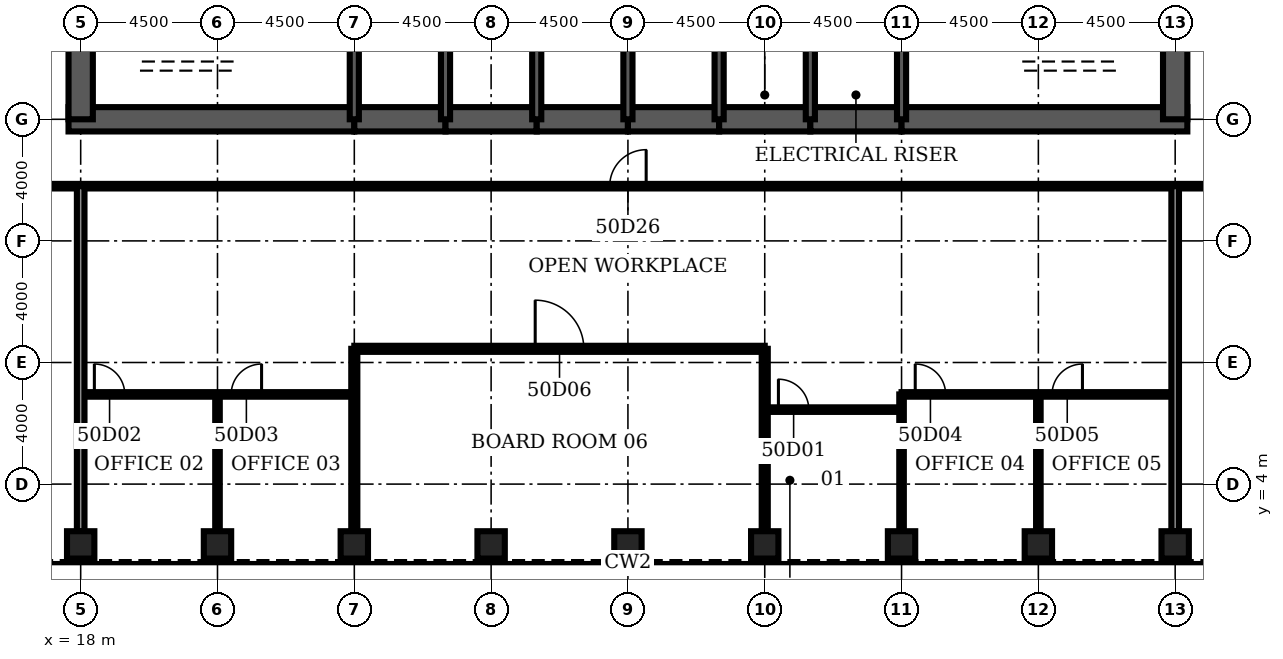
"""IFC4 building model, lengths in metres.
Left out: names, types, materials, properties, quantities, classifications, styles, units other than length and angle.
Written with IfcOpenShell. Run it as: python <this file> out.ifc"""

import sys

from ifc_helpers import new_model, si_unit, direction, frame, frame_2d, origin, origin_2d, place, context, subcontext, project, spatial, rectangle, hollow_rectangle, extrude, element, fill, save


model = new_model("IFC4")
c1 = context("Model", 3, precision=1e-05, world=origin(), true_north=direction((0.0, 1.0)))
c2 = subcontext(c1, "Body", "Model", "MODEL_VIEW")
j1 = project(units=[si_unit("LENGTHUNIT", "METRE"), si_unit("PLANEANGLEUNIT", "RADIAN")], contexts=[c1])
p1 = place(None, origin())
s1 = spatial("IfcSite", under=j1, at=p1, CompositionType="ELEMENT")
p2 = place(p1, origin())
s2 = spatial("IfcBuilding", under=s1, at=p2, CompositionType="ELEMENT")
p3 = place(p2, frame((0.0, 0.0, 223.6)))
s3 = spatial("IfcBuildingStorey", under=s2, at=p3, CompositionType="ELEMENT", Elevation=223.6)
for number, where, z_axis, x_axis in (
    (1, (18.0, 2.0, 0.0), (0.0, 0.0, 1.0), (0.0, 1.0, 0.0)),
    (2, (22.5, 2.0, 0.0), (0.0, 0.0, 1.0), (0.0, 1.0, 0.0)),
    (3, (27.0, 2.0, 0.0), (0.0, 0.0, 1.0), (0.0, 1.0, 0.0)),
    (4, (31.5, 2.0, 0.0), (0.0, 0.0, 1.0), (0.0, 1.0, 0.0)),
    (5, (36.0, 2.0, 0.0), (0.0, 0.0, 1.0), (0.0, 1.0, 0.0)),
    (6, (40.5, 2.0, 0.0), (0.0, 0.0, 1.0), (0.0, 1.0, 0.0)),
    (7, (45.0, 2.0, 0.0), (0.0, 0.0, 1.0), (0.0, 1.0, 0.0)),
    (8, (49.5, 2.0, 0.0), (0.0, 0.0, 1.0), (0.0, 1.0, 0.0)),
    (9, (54.0, 2.0, 0.0), (0.0, 0.0, 1.0), (0.0, 1.0, 0.0)),
):
    element("IfcColumn", number, at=place(p3, frame(where, z_axis=z_axis, x_axis=x_axis)), inside=s3, PredefinedType="COLUMN", context=c2, shape_type="SweptSolid", body=[
        extrude(hollow_rectangle(XDim=0.9, YDim=0.9, WallThickness=0.08, at=origin_2d()), origin(), (0.0, 0.0, 1.0), 4.2),
    ])
p4 = place(p3, frame((17.6, 16.0, 0.0), z_axis=(0.0, 0.0, 1.0), x_axis=(1.0, 0.0, 0.0)))
e10 = element("IfcWall", 10, at=p4, inside=s3, PredefinedType="SHEAR", context=c2, shape_type="SweptSolid", body=[
    extrude(rectangle(XDim=9.4, YDim=0.8, at=frame_2d((4.7, 0.0))), origin(), (0.0, 0.0, 1.0), 4.2),
])
for number, where, z_axis, x_axis in (
    (11, (27.0, 16.0, 0.0), (0.0, 0.0, 1.0), (1.0, 0.0, 0.0)),
    (12, (30.0, 16.0, 0.0), (0.0, 0.0, 1.0), (1.0, 0.0, 0.0)),
    (13, (33.0, 16.0, 0.0), (0.0, 0.0, 1.0), (1.0, 0.0, 0.0)),
    (14, (36.0, 16.0, 0.0), (0.0, 0.0, 1.0), (1.0, 0.0, 0.0)),
    (15, (39.0, 16.0, 0.0), (0.0, 0.0, 1.0), (1.0, 0.0, 0.0)),
    (16, (42.0, 16.0, 0.0), (0.0, 0.0, 1.0), (1.0, 0.0, 0.0)),
):
    element("IfcWall", number, at=place(p3, frame(where, z_axis=z_axis, x_axis=x_axis)), inside=s3, PredefinedType="SHEAR", context=c2, shape_type="SweptSolid", body=[
        extrude(rectangle(XDim=3.0, YDim=0.8, at=frame_2d((1.5, 0.0))), origin(), (0.0, 0.0, 1.0), 4.2),
    ])
p5 = place(p3, frame((45.0, 16.0, 0.0), z_axis=(0.0, 0.0, 1.0), x_axis=(1.0, 0.0, 0.0)))
e17 = element("IfcWall", 17, at=p5, inside=s3, PredefinedType="SHEAR", context=c2, shape_type="SweptSolid", body=[
    extrude(rectangle(XDim=9.4, YDim=0.8, at=frame_2d((4.7, 0.0))), origin(), (0.0, 0.0, 1.0), 4.2),
])
for number, where, z_axis, x_axis in (
    (18, (18.0, 19.2, 0.0), (0.0, 0.0, 1.0), (0.0, -1.0, 0.0)),
    (19, (54.0, 16.0, 0.0), (0.0, 0.0, 1.0), (0.0, 1.0, 0.0)),
):
    element("IfcWall", number, at=place(p3, frame(where, z_axis=z_axis, x_axis=x_axis)), inside=s3, PredefinedType="SHEAR", context=c2, shape_type="SweptSolid", body=[
        extrude(rectangle(XDim=3.2, YDim=0.8, at=frame_2d((1.6, 0.0))), origin(), (0.0, 0.0, 1.0), 4.2),
    ])
for number, where, z_axis, x_axis in (
    (20, (27.0, 16.0, 0.0), (0.0, 0.0, 1.0), (0.0, 1.0, 0.0)),
    (21, (30.0, 16.0, 0.0), (0.0, 0.0, 1.0), (0.0, 1.0, 0.0)),
    (22, (33.0, 16.0, 0.0), (0.0, 0.0, 1.0), (0.0, 1.0, 0.0)),
    (23, (36.0, 16.0, 0.0), (0.0, 0.0, 1.0), (0.0, 1.0, 0.0)),
    (24, (39.0, 16.0, 0.0), (0.0, 0.0, 1.0), (0.0, 1.0, 0.0)),
    (25, (42.0, 16.0, 0.0), (0.0, 0.0, 1.0), (0.0, 1.0, 0.0)),
    (26, (45.0, 16.0, 0.0), (0.0, 0.0, 1.0), (0.0, 1.0, 0.0)),
):
    element("IfcWall", number, at=place(p3, frame(where, z_axis=z_axis, x_axis=x_axis)), inside=s3, PredefinedType="SOLIDWALL", context=c2, shape_type="SweptSolid", body=[
        extrude(rectangle(XDim=3.2, YDim=0.3, at=frame_2d((1.6, 0.0))), origin(), (0.0, 0.0, 1.0), 4.2),
    ])
p6 = place(p3, frame((39.15, 17.35, 0.0), z_axis=(0.0, 0.0, 1.0), x_axis=(1.0, 0.0, 0.0)))
e27 = element("IfcWall", 27, at=p6, inside=s3, PredefinedType="SOLIDWALL", context=c2, shape_type="SweptSolid", body=[
    extrude(rectangle(XDim=2.7, YDim=0.3, at=frame_2d((1.35, 0.0))), origin(), (0.0, 0.0, 1.0), 4.04),
])
p7 = place(p6, frame((0.85, 0.0, 0.0)))
e28 = element("IfcOpeningElement", 28, at=p7, cuts=e27, PredefinedType="OPENING", context=c2, shape_type="SweptSolid", body=[
    extrude(rectangle(XDim=1.0, YDim=2.1, at=frame_2d((0.5, 1.05))), frame((0.0, 0.16, 0.0), z_axis=(0.0, -1.0, 0.0), x_axis=(1.0, 0.0, 0.0)), (0.0, 0.0, 1.0), 0.32),
])
p8 = place(p3, frame((42.15, 17.35, 0.0), z_axis=(0.0, 0.0, 1.0), x_axis=(1.0, 0.0, 0.0)))
e29 = element("IfcWall", 29, at=p8, inside=s3, PredefinedType="SOLIDWALL", context=c2, shape_type="SweptSolid", body=[
    extrude(rectangle(XDim=2.7, YDim=0.3, at=frame_2d((1.35, 0.0))), origin(), (0.0, 0.0, 1.0), 4.04),
])
p9 = place(p8, frame((0.85, 0.0, 0.0)))
e30 = element("IfcOpeningElement", 30, at=p9, cuts=e29, PredefinedType="OPENING", context=c2, shape_type="SweptSolid", body=[
    extrude(rectangle(XDim=1.0, YDim=2.1, at=frame_2d((0.5, 1.05))), frame((0.0, 0.16, 0.0), z_axis=(0.0, -1.0, 0.0), x_axis=(1.0, 0.0, 0.0)), (0.0, 0.0, 1.0), 0.32),
])
p10 = place(p3, frame((40.5, 6.45, 0.0), z_axis=(0.0, 0.0, 1.0), x_axis=(1.0, 0.0, 0.0)))
e31 = element("IfcWall", 31, at=p10, inside=s3, PredefinedType="PARTITIONING", context=c2, shape_type="SweptSolid", body=[
    extrude(rectangle(XDim=4.5, YDim=0.15, at=frame_2d((2.25, 0.0))), origin(), (0.0, 0.0, 1.0), 3.0),
])
p11 = place(p10, frame((0.45, 0.0, 0.0)))
e32 = element("IfcOpeningElement", 32, at=p11, cuts=e31, PredefinedType="OPENING", context=c2, shape_type="SweptSolid", body=[
    extrude(rectangle(XDim=1.0, YDim=2.1, at=frame_2d((0.5, 1.05))), frame((0.0, 0.085, 0.0), z_axis=(0.0, -1.0, 0.0), x_axis=(1.0, 0.0, 0.0)), (0.0, 0.0, 1.0), 0.17),
])
p12 = place(p3, frame((18.0, 6.95, 0.0), z_axis=(0.0, 0.0, 1.0), x_axis=(1.0, 0.0, 0.0)))
e33 = element("IfcWall", 33, at=p12, inside=s3, PredefinedType="PARTITIONING", context=c2, shape_type="SweptSolid", body=[
    extrude(rectangle(XDim=9.0, YDim=0.15, at=frame_2d((4.5, 0.0))), origin(), (0.0, 0.0, 1.0), 3.0),
])
p13 = place(p12, frame((0.45, 0.0, 0.0)))
e34 = element("IfcOpeningElement", 34, at=p13, cuts=e33, PredefinedType="OPENING", context=c2, shape_type="SweptSolid", body=[
    extrude(rectangle(XDim=1.0, YDim=2.1, at=frame_2d((0.5, 1.05))), frame((0.0, 0.085, 0.0), z_axis=(0.0, -1.0, 0.0), x_axis=(1.0, 0.0, 0.0)), (0.0, 0.0, 1.0), 0.17),
])
p14 = place(p12, frame((4.95, 0.0, 0.0)))
e35 = element("IfcOpeningElement", 35, at=p14, cuts=e33, PredefinedType="OPENING", context=c2, shape_type="SweptSolid", body=[
    extrude(rectangle(XDim=1.0, YDim=2.1, at=frame_2d((0.5, 1.05))), frame((0.0, 0.085, 0.0), z_axis=(0.0, -1.0, 0.0), x_axis=(1.0, 0.0, 0.0)), (0.0, 0.0, 1.0), 0.17),
])
p15 = place(p3, frame((45.0, 6.95, 0.0), z_axis=(0.0, 0.0, 1.0), x_axis=(1.0, 0.0, 0.0)))
e36 = element("IfcWall", 36, at=p15, inside=s3, PredefinedType="PARTITIONING", context=c2, shape_type="SweptSolid", body=[
    extrude(rectangle(XDim=9.0, YDim=0.15, at=frame_2d((4.5, 0.0))), origin(), (0.0, 0.0, 1.0), 3.0),
])
p16 = place(p15, frame((0.45, 0.0, 0.0)))
e37 = element("IfcOpeningElement", 37, at=p16, cuts=e36, PredefinedType="OPENING", context=c2, shape_type="SweptSolid", body=[
    extrude(rectangle(XDim=1.0, YDim=2.1, at=frame_2d((0.5, 1.05))), frame((0.0, 0.085, 0.0), z_axis=(0.0, -1.0, 0.0), x_axis=(1.0, 0.0, 0.0)), (0.0, 0.0, 1.0), 0.17),
])
p17 = place(p15, frame((4.95, 0.0, 0.0)))
e38 = element("IfcOpeningElement", 38, at=p17, cuts=e36, PredefinedType="OPENING", context=c2, shape_type="SweptSolid", body=[
    extrude(rectangle(XDim=1.0, YDim=2.1, at=frame_2d((0.5, 1.05))), frame((0.0, 0.085, 0.0), z_axis=(0.0, -1.0, 0.0), x_axis=(1.0, 0.0, 0.0)), (0.0, 0.0, 1.0), 0.17),
])
p18 = place(p3, frame((27.0, 8.45, 0.0), z_axis=(0.0, 0.0, 1.0), x_axis=(1.0, 0.0, 0.0)))
e39 = element("IfcWall", 39, at=p18, inside=s3, PredefinedType="PARTITIONING", context=c2, shape_type="SweptSolid", body=[
    extrude(rectangle(XDim=13.5, YDim=0.2, at=frame_2d((6.75, 0.0))), origin(), (0.0, 0.0, 1.0), 3.0),
])
p19 = place(p18, frame((5.95, 0.0, 0.0)))
e40 = element("IfcOpeningElement", 40, at=p19, cuts=e39, PredefinedType="OPENING", context=c2, shape_type="SweptSolid", body=[
    extrude(rectangle(XDim=1.6, YDim=2.1, at=frame_2d((0.8, 1.05))), frame((0.0, 0.11, 0.0), z_axis=(0.0, -1.0, 0.0), x_axis=(1.0, 0.0, 0.0)), (0.0, 0.0, 1.0), 0.22),
])
p20 = place(p3, frame((15.2, 13.8, 0.0), z_axis=(0.0, 0.0, 1.0), x_axis=(1.0, 0.0, 0.0)))
e41 = element("IfcWall", 41, at=p20, inside=s3, PredefinedType="PARTITIONING", context=c2, shape_type="SweptSolid", body=[
    extrude(rectangle(XDim=41.6, YDim=0.15, at=frame_2d((20.8, 0.0))), origin(), (0.0, 0.0, 1.0), 3.0),
])
p21 = place(p20, frame((20.2, 0.0, 0.0)))
e42 = element("IfcOpeningElement", 42, at=p21, cuts=e41, PredefinedType="OPENING", context=c2, shape_type="SweptSolid", body=[
    extrude(rectangle(XDim=1.2, YDim=2.1, at=frame_2d((0.6, 1.05))), frame((0.0, 0.085, 0.0), z_axis=(0.0, -1.0, 0.0), x_axis=(1.0, 0.0, 0.0)), (0.0, 0.0, 1.0), 0.17),
])
p22 = place(p3, frame((18.0, 2.45, 0.0), z_axis=(0.0, 0.0, 1.0), x_axis=(0.0, 1.0, 0.0)))
e43 = element("IfcWall", 43, at=p22, inside=s3, PredefinedType="PARTITIONING", context=c2, shape_type="SweptSolid", body=[
    extrude(rectangle(XDim=11.35, YDim=0.25, at=frame_2d((5.675, 0.0))), origin(), (0.0, 0.0, 1.0), 3.0),
])
p23 = place(p3, frame((22.5, 2.45, 0.0), z_axis=(0.0, 0.0, 1.0), x_axis=(0.0, 1.0, 0.0)))
e44 = element("IfcWall", 44, at=p23, inside=s3, PredefinedType="PARTITIONING", context=c2, shape_type="SweptSolid", body=[
    extrude(rectangle(XDim=4.5, YDim=0.15, at=frame_2d((2.25, 0.0))), origin(), (0.0, 0.0, 1.0), 3.0),
])
for number, where, z_axis, x_axis in (
    (45, (27.0, 2.45, 0.0), (0.0, 0.0, 1.0), (0.0, 1.0, 0.0)),
    (46, (40.5, 2.45, 0.0), (0.0, 0.0, 1.0), (0.0, 1.0, 0.0)),
):
    element("IfcWall", number, at=place(p3, frame(where, z_axis=z_axis, x_axis=x_axis)), inside=s3, PredefinedType="PARTITIONING", context=c2, shape_type="SweptSolid", body=[
        extrude(rectangle(XDim=6.0, YDim=0.2, at=frame_2d((3.0, 0.0))), origin(), (0.0, 0.0, 1.0), 3.0),
    ])
for number, where, z_axis, x_axis in (
    (47, (45.0, 2.45, 0.0), (0.0, 0.0, 1.0), (0.0, 1.0, 0.0)),
    (48, (49.5, 2.45, 0.0), (0.0, 0.0, 1.0), (0.0, 1.0, 0.0)),
):
    element("IfcWall", number, at=place(p3, frame(where, z_axis=z_axis, x_axis=x_axis)), inside=s3, PredefinedType="PARTITIONING", context=c2, shape_type="SweptSolid", body=[
        extrude(rectangle(XDim=4.5, YDim=0.15, at=frame_2d((2.25, 0.0))), origin(), (0.0, 0.0, 1.0), 3.0),
    ])
p24 = place(p3, frame((54.0, 2.45, 0.0), z_axis=(0.0, 0.0, 1.0), x_axis=(0.0, 1.0, 0.0)))
e49 = element("IfcWall", 49, at=p24, inside=s3, PredefinedType="PARTITIONING", context=c2, shape_type="SweptSolid", body=[
    extrude(rectangle(XDim=11.35, YDim=0.25, at=frame_2d((5.675, 0.0))), origin(), (0.0, 0.0, 1.0), 3.0),
])
p25 = place(p7, origin())
e50 = element("IfcDoor", 50, at=p25, inside=s3, OperationType="SINGLE_SWING_LEFT", PredefinedType="DOOR", context=c2, shape_type="SweptSolid", body=[
    extrude(rectangle(XDim=1.0, YDim=2.1, at=frame_2d((0.5, 1.05))), frame((0.0, 0.025, 0.0), z_axis=(0.0, -1.0, 0.0), x_axis=(1.0, 0.0, 0.0)), (0.0, 0.0, 1.0), 0.05),
])
fill(e28, e50)
p26 = place(p9, origin())
e51 = element("IfcDoor", 51, at=p26, inside=s3, OperationType="SINGLE_SWING_LEFT", PredefinedType="DOOR", context=c2, shape_type="SweptSolid", body=[
    extrude(rectangle(XDim=1.0, YDim=2.1, at=frame_2d((0.5, 1.05))), frame((0.0, 0.025, 0.0), z_axis=(0.0, -1.0, 0.0), x_axis=(1.0, 0.0, 0.0)), (0.0, 0.0, 1.0), 0.05),
])
fill(e30, e51)
p27 = place(p11, origin())
e52 = element("IfcDoor", 52, at=p27, inside=s3, OperationType="SINGLE_SWING_LEFT", PredefinedType="DOOR", context=c2, shape_type="SweptSolid", body=[
    extrude(rectangle(XDim=1.0, YDim=2.1, at=frame_2d((0.5, 1.05))), frame((0.0, 0.025, 0.0), z_axis=(0.0, -1.0, 0.0), x_axis=(1.0, 0.0, 0.0)), (0.0, 0.0, 1.0), 0.05),
])
fill(e32, e52)
p28 = place(p13, origin())
e53 = element("IfcDoor", 53, at=p28, inside=s3, OperationType="SINGLE_SWING_LEFT", PredefinedType="DOOR", context=c2, shape_type="SweptSolid", body=[
    extrude(rectangle(XDim=1.0, YDim=2.1, at=frame_2d((0.5, 1.05))), frame((0.0, 0.025, 0.0), z_axis=(0.0, -1.0, 0.0), x_axis=(1.0, 0.0, 0.0)), (0.0, 0.0, 1.0), 0.05),
])
fill(e34, e53)
p29 = place(p14, origin())
e54 = element("IfcDoor", 54, at=p29, inside=s3, OperationType="SINGLE_SWING_RIGHT", PredefinedType="DOOR", context=c2, shape_type="SweptSolid", body=[
    extrude(rectangle(XDim=1.0, YDim=2.1, at=frame_2d((0.5, 1.05))), frame((0.0, 0.025, 0.0), z_axis=(0.0, -1.0, 0.0), x_axis=(1.0, 0.0, 0.0)), (0.0, 0.0, 1.0), 0.05),
])
fill(e35, e54)
p30 = place(p16, origin())
e55 = element("IfcDoor", 55, at=p30, inside=s3, OperationType="SINGLE_SWING_LEFT", PredefinedType="DOOR", context=c2, shape_type="SweptSolid", body=[
    extrude(rectangle(XDim=1.0, YDim=2.1, at=frame_2d((0.5, 1.05))), frame((0.0, 0.025, 0.0), z_axis=(0.0, -1.0, 0.0), x_axis=(1.0, 0.0, 0.0)), (0.0, 0.0, 1.0), 0.05),
])
fill(e37, e55)
p31 = place(p17, origin())
e56 = element("IfcDoor", 56, at=p31, inside=s3, OperationType="SINGLE_SWING_RIGHT", PredefinedType="DOOR", context=c2, shape_type="SweptSolid", body=[
    extrude(rectangle(XDim=1.0, YDim=2.1, at=frame_2d((0.5, 1.05))), frame((0.0, 0.025, 0.0), z_axis=(0.0, -1.0, 0.0), x_axis=(1.0, 0.0, 0.0)), (0.0, 0.0, 1.0), 0.05),
])
fill(e38, e56)
p32 = place(p19, origin())
e57 = element("IfcDoor", 57, at=p32, inside=s3, OperationType="SINGLE_SWING_LEFT", PredefinedType="DOOR", context=c2, shape_type="SweptSolid", body=[
    extrude(rectangle(XDim=1.6, YDim=2.1, at=frame_2d((0.8, 1.05))), frame((0.0, 0.025, 0.0), z_axis=(0.0, -1.0, 0.0), x_axis=(1.0, 0.0, 0.0)), (0.0, 0.0, 1.0), 0.05),
])
fill(e40, e57)
p33 = place(p21, origin())
e58 = element("IfcDoor", 58, at=p33, inside=s3, OperationType="SINGLE_SWING_RIGHT", PredefinedType="DOOR", context=c2, shape_type="SweptSolid", body=[
    extrude(rectangle(XDim=1.2, YDim=2.1, at=frame_2d((0.6, 1.05))), frame((0.0, 0.025, 0.0), z_axis=(0.0, -1.0, 0.0), x_axis=(1.0, 0.0, 0.0)), (0.0, 0.0, 1.0), 0.05),
])
fill(e42, e58)
save(model, sys.argv[1])
